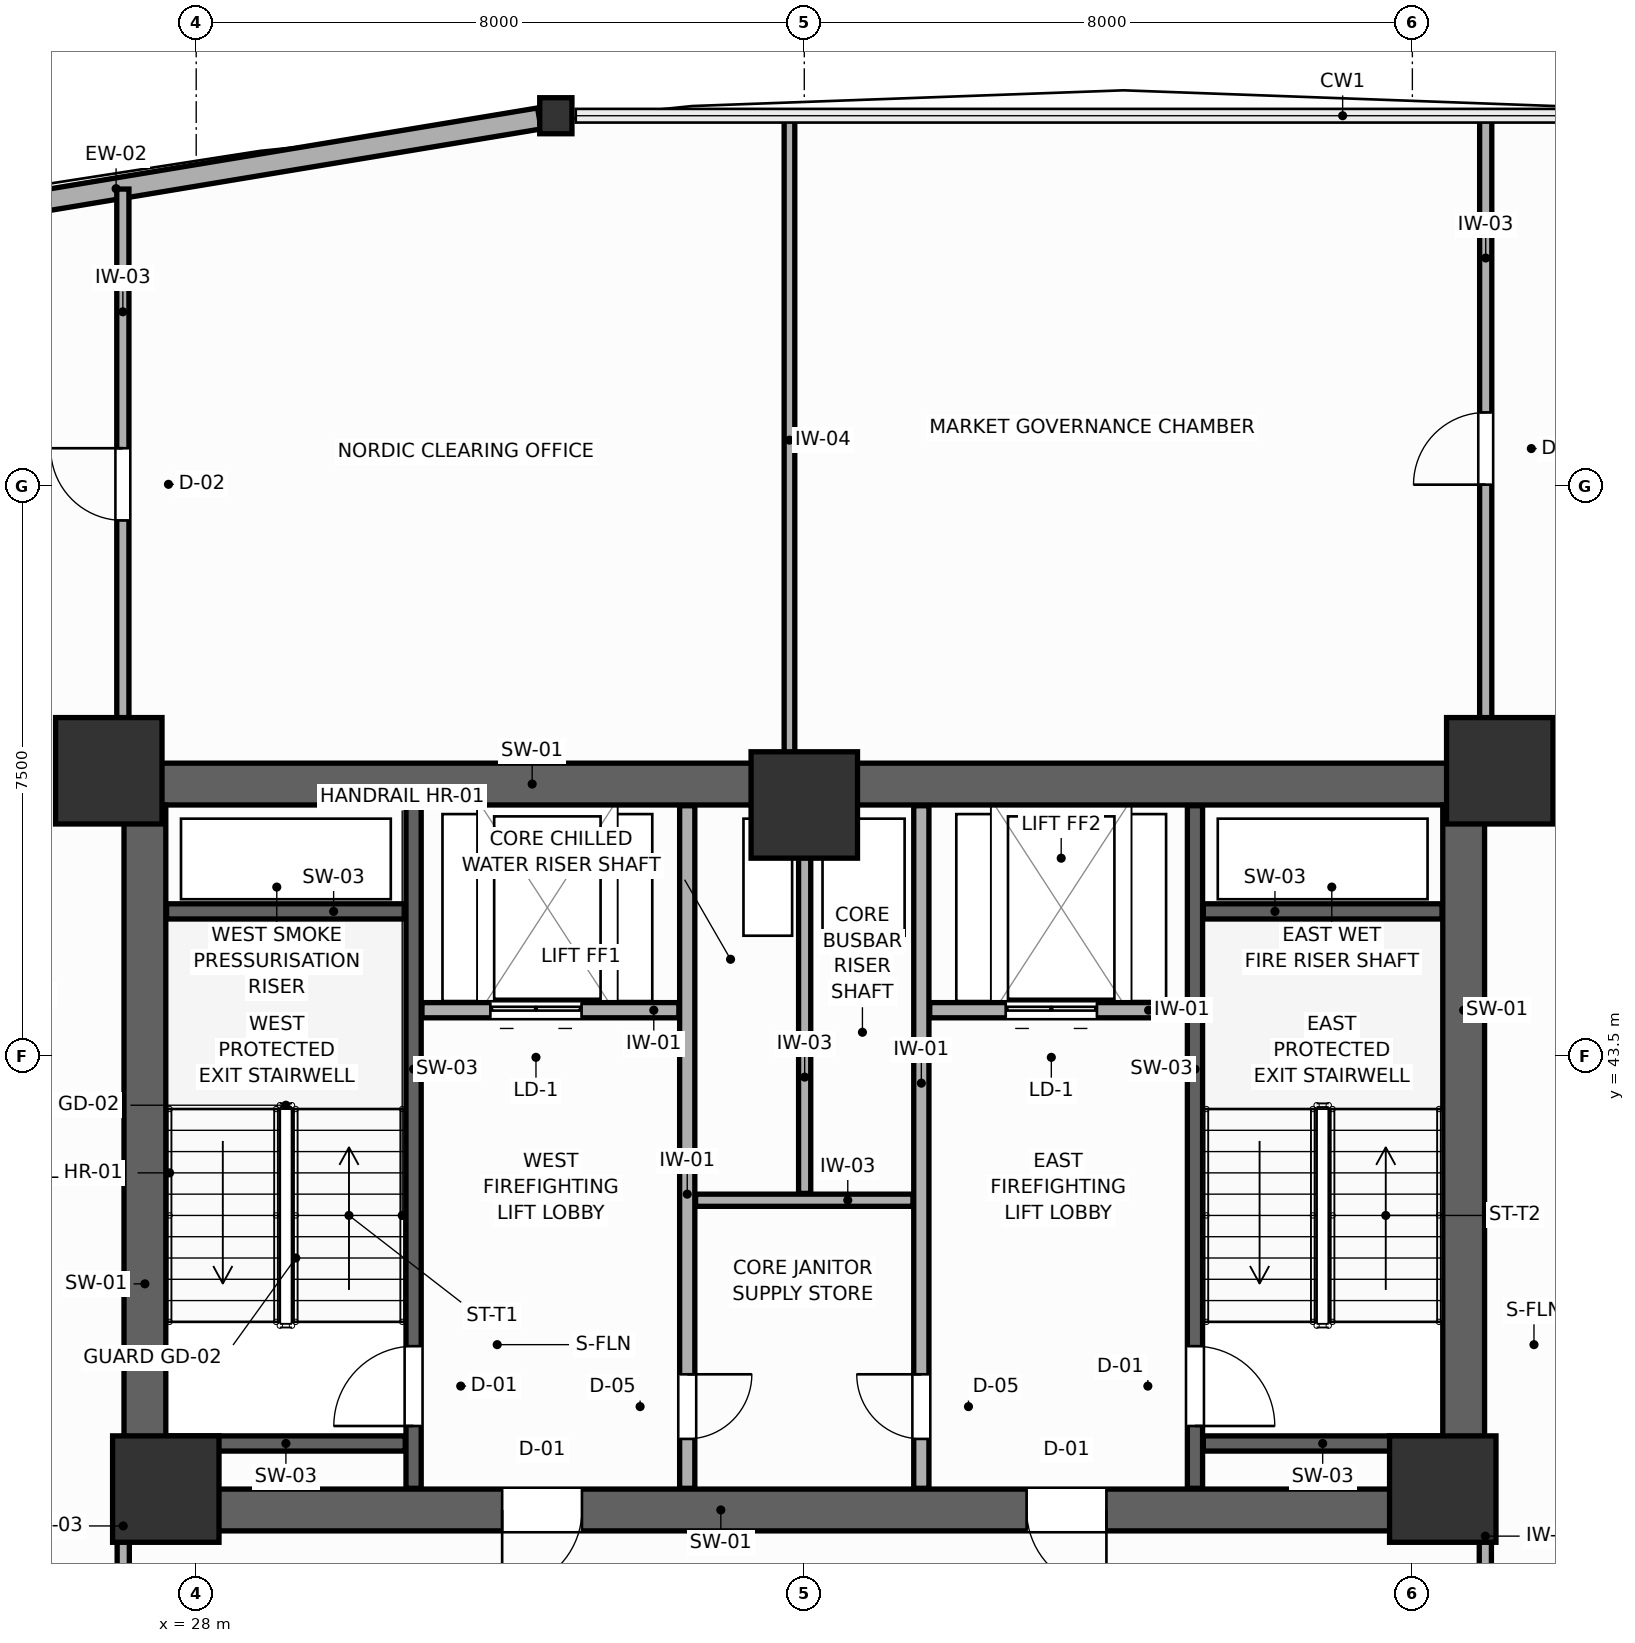
"""IFC4 building model, lengths in metres.
Left out: names, types, materials, properties, quantities, classifications, styles, units other than length and angle.
Written with IfcOpenShell. Run it as: python <this file> out.ifc"""

import sys

from ifc_helpers import new_model, si_unit, direction, frame, frame_2d, origin, origin_2d, place, context, subcontext, project, spatial, rectangle, i_section, extrude, source, transform, mapped, element, fill, save


model = new_model("IFC4")
c1 = context("Model", 3, precision=1e-05, world=origin(), true_north=direction((0.0, 1.0)))
c2 = subcontext(c1, "Body", "Model", "MODEL_VIEW")
j1 = project(units=[si_unit("LENGTHUNIT", "METRE"), si_unit("PLANEANGLEUNIT", "RADIAN")], contexts=[c1])
p1 = place(None, origin())
s1 = spatial("IfcSite", under=j1, at=p1, CompositionType="ELEMENT")
p2 = place(p1, origin())
s2 = spatial("IfcBuilding", under=s1, at=p2, CompositionType="ELEMENT")
p3 = place(p2, frame((0.0, 0.0, 79.5)))
s3 = spatial("IfcBuildingStorey", under=s2, at=p3, CompositionType="ELEMENT", Elevation=79.5)
p4 = place(p3, frame((27.05, 47.075, 0.0), z_axis=(0.0, 0.0, 1.0), x_axis=(1.0, 0.0, 0.0)))
e1 = element("IfcWall", 1, at=p4, inside=s3, PredefinedType="SHEAR", context=c2, shape_type="SweptSolid", body=[
    extrude(rectangle(XDim=17.9, YDim=0.55, at=frame_2d((8.95, 0.0))), origin(), (0.0, 0.0, 1.0), 3.9),
])
p5 = place(p3, frame((27.05, 37.525, 0.0), z_axis=(0.0, 0.0, 1.0), x_axis=(1.0, 0.0, 0.0)))
e2 = element("IfcWall", 2, at=p5, inside=s3, PredefinedType="SHEAR", context=c2, shape_type="SweptSolid", body=[
    extrude(rectangle(XDim=17.9, YDim=0.55, at=frame_2d((8.95, 0.0))), origin(), (0.0, 0.0, 1.0), 3.9),
])
p6 = place(p5, frame((4.975, 0.0, 0.0)))
e3 = element("IfcOpeningElement", 3, at=p6, cuts=e2, PredefinedType="OPENING", context=c2, shape_type="SweptSolid", body=[
    extrude(rectangle(XDim=1.05, YDim=2.1, at=frame_2d((0.525, 1.05))), frame((0.0, 0.285, 0.0), z_axis=(0.0, -1.0, 0.0), x_axis=(1.0, 0.0, 0.0)), (0.0, 0.0, 1.0), 0.57),
])
p7 = place(p5, frame((11.875, 0.0, 0.0)))
e4 = element("IfcOpeningElement", 4, at=p7, cuts=e2, PredefinedType="OPENING", context=c2, shape_type="SweptSolid", body=[
    extrude(rectangle(XDim=1.05, YDim=2.1, at=frame_2d((0.525, 1.05))), frame((0.0, 0.285, 0.0), z_axis=(0.0, -1.0, 0.0), x_axis=(1.0, 0.0, 0.0)), (0.0, 0.0, 1.0), 0.57),
])
for number, where, z_axis, x_axis in (
    (5, (27.325, 37.8, 0.0), (0.0, 0.0, 1.0), (0.0, 1.0, 0.0)),
    (6, (44.675, 37.8, 0.0), (0.0, 0.0, 1.0), (0.0, 1.0, 0.0)),
):
    element("IfcWall", number, at=place(p3, frame(where, z_axis=z_axis, x_axis=x_axis)), inside=s3, PredefinedType="SHEAR", context=c2, shape_type="SweptSolid", body=[
        extrude(rectangle(XDim=9.0, YDim=0.55, at=frame_2d((4.5, 0.0))), origin(), (0.0, 0.0, 1.0), 3.9),
    ])
m1 = source(origin(), c2, "Body", "SweptSolid", [
    extrude(rectangle(XDim=1.4, YDim=1.4, at=origin_2d()), origin(), (0.0, 0.0, 1.0), 3.9),
])
for number, where, z_axis, x_axis in (
    (7, (26.85, 47.25, 0.0), (0.0, 0.0, 1.0), (1.0, 0.0, 0.0)),
    (8, (45.15, 47.25, 0.0), (0.0, 0.0, 1.0), (1.0, 0.0, 0.0)),
    (9, (27.6, 37.8, 0.0), (0.0, 0.0, 1.0), (1.0, 0.0, 0.0)),
    (10, (44.4, 37.8, 0.0), (0.0, 0.0, 1.0), (1.0, 0.0, 0.0)),
    (11, (36.0, 46.8, 0.0), (0.0, 0.0, 1.0), (1.0, 0.0, 0.0)),
):
    element("IfcColumn", number, at=place(p3, frame(where, z_axis=z_axis, x_axis=x_axis)), inside=s3, PredefinedType="COLUMN", context=c2, shape_type="MappedRepresentation", body=[
        mapped(m1, transform((0.0, 0.0, 0.0), scale=1.0)),
    ])
m2 = source(origin(), c2, "Body", "SweptSolid", [
    extrude(i_section(OverallWidth=0.424, OverallDepth=0.474, WebThickness=0.045, FlangeThickness=0.072, FilletRadius=0.015, at=origin_2d()), origin(), (0.0, 0.0, 1.0), 3.9),
])
p8 = place(p3, frame((32.731, 55.868, 0.0), z_axis=(0.0, 0.0, 1.0), x_axis=(1.0, 0.0, 0.0)))
e12 = element("IfcColumn", 12, at=p8, inside=s3, PredefinedType="COLUMN", context=c2, shape_type="MappedRepresentation", body=[
    mapped(m2, transform((0.0, 0.0, 0.0), scale=1.0)),
])
p9 = place(p3, frame((32.514, 55.832, 0.0), z_axis=(0.0, 0.0, 1.0), x_axis=(-0.986523610756, -0.163618964122, 0.0)))
e13 = element("IfcWall", 13, at=p9, inside=s3, PredefinedType="SOLIDWALL", context=c2, shape_type="SweptSolid", body=[
    extrude(rectangle(XDim=17.258, YDim=0.28, at=frame_2d((8.629, 0.0))), origin(), (0.0, 0.0, 1.0), 3.23),
])
p10 = place(p9, frame((11.469, 0.0, 0.75)))
e14 = element("IfcOpeningElement", 14, at=p10, cuts=e13, PredefinedType="OPENING", context=c2, shape_type="SweptSolid", body=[
    extrude(rectangle(XDim=1.7, YDim=1.75, at=frame_2d((0.85, 0.875))), frame((0.0, 0.15, 0.0), z_axis=(0.0, -1.0, 0.0), x_axis=(1.0, 0.0, 0.0)), (0.0, 0.0, 1.0), 0.3),
])
p11 = place(p3, frame((30.86, 37.81, 0.0), z_axis=(0.0, 0.0, 1.0), x_axis=(0.0, 1.0, 0.0)))
e15 = element("IfcWall", 15, at=p11, inside=s3, PredefinedType="SHEAR", context=c2, shape_type="SweptSolid", body=[
    extrude(rectangle(XDim=8.98, YDim=0.2, at=frame_2d((4.49, 0.0))), origin(), (0.0, 0.0, 1.0), 3.9),
])
p12 = place(p11, frame((0.82, 0.0, 0.0)))
e16 = element("IfcOpeningElement", 16, at=p12, cuts=e15, PredefinedType="OPENING", context=c2, shape_type="SweptSolid", body=[
    extrude(rectangle(XDim=1.05, YDim=2.1, at=frame_2d((0.525, 1.05))), frame((0.0, 0.11, 0.0), z_axis=(0.0, -1.0, 0.0), x_axis=(1.0, 0.0, 0.0)), (0.0, 0.0, 1.0), 0.22),
])
for number, where, z_axis, x_axis in (
    (17, (27.61, 45.4, 0.0), (0.0, 0.0, 1.0), (1.0, 0.0, 0.0)),
    (18, (27.61, 38.4, 0.0), (0.0, 0.0, 1.0), (1.0, 0.0, 0.0)),
):
    element("IfcWall", number, at=place(p3, frame(where, z_axis=z_axis, x_axis=x_axis)), inside=s3, PredefinedType="SHEAR", context=c2, shape_type="SweptSolid", body=[
        extrude(rectangle(XDim=3.14, YDim=0.2, at=frame_2d((1.57, 0.0))), origin(), (0.0, 0.0, 1.0), 3.9),
    ])
p13 = place(p3, frame((41.14, 37.81, 0.0), z_axis=(0.0, 0.0, 1.0), x_axis=(0.0, 1.0, 0.0)))
e19 = element("IfcWall", 19, at=p13, inside=s3, PredefinedType="SHEAR", context=c2, shape_type="SweptSolid", body=[
    extrude(rectangle(XDim=8.98, YDim=0.2, at=frame_2d((4.49, 0.0))), origin(), (0.0, 0.0, 1.0), 3.9),
])
p14 = place(p13, frame((0.82, 0.0, 0.0)))
e20 = element("IfcOpeningElement", 20, at=p14, cuts=e19, PredefinedType="OPENING", context=c2, shape_type="SweptSolid", body=[
    extrude(rectangle(XDim=1.05, YDim=2.1, at=frame_2d((0.525, 1.05))), frame((0.0, 0.11, 0.0), z_axis=(0.0, -1.0, 0.0), x_axis=(1.0, 0.0, 0.0)), (0.0, 0.0, 1.0), 0.22),
])
for number, where, z_axis, x_axis in (
    (21, (41.25, 45.4, 0.0), (0.0, 0.0, 1.0), (1.0, 0.0, 0.0)),
    (22, (41.25, 38.4, 0.0), (0.0, 0.0, 1.0), (1.0, 0.0, 0.0)),
):
    element("IfcWall", number, at=place(p3, frame(where, z_axis=z_axis, x_axis=x_axis)), inside=s3, PredefinedType="SHEAR", context=c2, shape_type="SweptSolid", body=[
        extrude(rectangle(XDim=3.14, YDim=0.2, at=frame_2d((1.57, 0.0))), origin(), (0.0, 0.0, 1.0), 3.9),
    ])
p15 = place(p3, frame((30.97, 44.1, 0.0), z_axis=(0.0, 0.0, 1.0), x_axis=(1.0, 0.0, 0.0)))
e23 = element("IfcWall", 23, at=p15, inside=s3, PredefinedType="PARTITIONING", context=c2, shape_type="SweptSolid", body=[
    extrude(rectangle(XDim=3.38, YDim=0.2, at=frame_2d((1.69, 0.0))), origin(), (0.0, 0.0, 1.0), 3.68),
])
p16 = place(p15, frame((0.9, 0.0, 0.0)))
e24 = element("IfcOpeningElement", 24, at=p16, cuts=e23, PredefinedType="OPENING", context=c2, shape_type="SweptSolid", body=[
    extrude(rectangle(XDim=1.2, YDim=2.1, at=frame_2d((0.6, 1.05))), frame((0.0, 0.11, 0.0), z_axis=(0.0, -1.0, 0.0), x_axis=(1.0, 0.0, 0.0)), (0.0, 0.0, 1.0), 0.22),
])
p17 = place(p3, frame((37.65, 44.1, 0.0), z_axis=(0.0, 0.0, 1.0), x_axis=(1.0, 0.0, 0.0)))
e25 = element("IfcWall", 25, at=p17, inside=s3, PredefinedType="PARTITIONING", context=c2, shape_type="SweptSolid", body=[
    extrude(rectangle(XDim=3.38, YDim=0.2, at=frame_2d((1.69, 0.0))), origin(), (0.0, 0.0, 1.0), 3.68),
])
p18 = place(p17, frame((1.0, 0.0, 0.0)))
e26 = element("IfcOpeningElement", 26, at=p18, cuts=e25, PredefinedType="OPENING", context=c2, shape_type="SweptSolid", body=[
    extrude(rectangle(XDim=1.2, YDim=2.1, at=frame_2d((0.6, 1.05))), frame((0.0, 0.11, 0.0), z_axis=(0.0, -1.0, 0.0), x_axis=(1.0, 0.0, 0.0)), (0.0, 0.0, 1.0), 0.22),
])
p19 = place(p3, frame((34.46, 37.81, 0.0), z_axis=(0.0, 0.0, 1.0), x_axis=(0.0, 1.0, 0.0)))
e27 = element("IfcWall", 27, at=p19, inside=s3, PredefinedType="PARTITIONING", context=c2, shape_type="SweptSolid", body=[
    extrude(rectangle(XDim=8.98, YDim=0.2, at=frame_2d((4.49, 0.0))), origin(), (0.0, 0.0, 1.0), 3.68),
])
p20 = place(p19, frame((0.65, 0.0, 0.0)))
e28 = element("IfcOpeningElement", 28, at=p20, cuts=e27, PredefinedType="OPENING", context=c2, shape_type="SweptSolid", body=[
    extrude(rectangle(XDim=0.85, YDim=2.05, at=frame_2d((0.425, 1.025))), frame((0.0, 0.11, 0.0), z_axis=(0.0, -1.0, 0.0), x_axis=(1.0, 0.0, 0.0)), (0.0, 0.0, 1.0), 0.22),
])
p21 = place(p3, frame((37.54, 37.81, 0.0), z_axis=(0.0, 0.0, 1.0), x_axis=(0.0, 1.0, 0.0)))
e29 = element("IfcWall", 29, at=p21, inside=s3, PredefinedType="PARTITIONING", context=c2, shape_type="SweptSolid", body=[
    extrude(rectangle(XDim=8.98, YDim=0.2, at=frame_2d((4.49, 0.0))), origin(), (0.0, 0.0, 1.0), 3.68),
])
p22 = place(p21, frame((0.65, 0.0, 0.0)))
e30 = element("IfcOpeningElement", 30, at=p22, cuts=e29, PredefinedType="OPENING", context=c2, shape_type="SweptSolid", body=[
    extrude(rectangle(XDim=0.85, YDim=2.05, at=frame_2d((0.425, 1.025))), frame((0.0, 0.11, 0.0), z_axis=(0.0, -1.0, 0.0), x_axis=(1.0, 0.0, 0.0)), (0.0, 0.0, 1.0), 0.22),
])
p23 = place(p3, frame((34.57, 41.6, 0.0), z_axis=(0.0, 0.0, 1.0), x_axis=(1.0, 0.0, 0.0)))
e31 = element("IfcWall", 31, at=p23, inside=s3, PredefinedType="PARTITIONING", context=c2, shape_type="SweptSolid", body=[
    extrude(rectangle(XDim=2.86, YDim=0.16, at=frame_2d((1.43, 0.0))), origin(), (0.0, 0.0, 1.0), 3.68),
])
p24 = place(p3, frame((36.005, 41.69, 0.0), z_axis=(0.0, 0.0, 1.0), x_axis=(0.0, 1.0, 0.0)))
e32 = element("IfcWall", 32, at=p24, inside=s3, PredefinedType="PARTITIONING", context=c2, shape_type="SweptSolid", body=[
    extrude(rectangle(XDim=5.1, YDim=0.16, at=frame_2d((2.55, 0.0))), origin(), (0.0, 0.0, 1.0), 3.68),
])
p25 = place(p3, frame((27.04, 35.0, 0.0), z_axis=(0.0, 0.0, 1.0), x_axis=(0.0, 1.0, 0.0)))
e33 = element("IfcWall", 33, at=p25, inside=s3, PredefinedType="PARTITIONING", context=c2, shape_type="SweptSolid", body=[
    extrude(rectangle(XDim=2.65, YDim=0.16, at=frame_2d((1.325, 0.0))), origin(), (0.0, 0.0, 1.0), 3.68),
])
p26 = place(p25, frame((0.75, 0.0, 0.0)))
e34 = element("IfcOpeningElement", 34, at=p26, cuts=e33, PredefinedType="OPENING", context=c2, shape_type="SweptSolid", body=[
    extrude(rectangle(XDim=1.05, YDim=2.1, at=frame_2d((0.525, 1.05))), frame((0.0, 0.09, 0.0), z_axis=(0.0, -1.0, 0.0), x_axis=(1.0, 0.0, 0.0)), (0.0, 0.0, 1.0), 0.18),
])
p27 = place(p3, frame((44.96, 35.0, 0.0), z_axis=(0.0, 0.0, 1.0), x_axis=(0.0, 1.0, 0.0)))
e35 = element("IfcWall", 35, at=p27, inside=s3, PredefinedType="PARTITIONING", context=c2, shape_type="SweptSolid", body=[
    extrude(rectangle(XDim=2.65, YDim=0.16, at=frame_2d((1.325, 0.0))), origin(), (0.0, 0.0, 1.0), 3.68),
])
p28 = place(p27, frame((0.75, 0.0, 0.0)))
e36 = element("IfcOpeningElement", 36, at=p28, cuts=e35, PredefinedType="OPENING", context=c2, shape_type="SweptSolid", body=[
    extrude(rectangle(XDim=1.05, YDim=2.1, at=frame_2d((0.525, 1.05))), frame((0.0, 0.09, 0.0), z_axis=(0.0, -1.0, 0.0), x_axis=(1.0, 0.0, 0.0)), (0.0, 0.0, 1.0), 0.18),
])
p29 = place(p3, frame((44.965, 47.34, 0.0), z_axis=(0.0, 0.0, 1.0), x_axis=(0.0, 1.0, 0.0)))
e37 = element("IfcWall", 37, at=p29, inside=s3, PredefinedType="PARTITIONING", context=c2, shape_type="SweptSolid", body=[
    extrude(rectangle(XDim=8.508, YDim=0.16, at=frame_2d((4.254, 0.0))), origin(), (0.0, 0.0, 1.0), 3.68),
])
p30 = place(p29, frame((3.674, 0.0, 0.0)))
e38 = element("IfcOpeningElement", 38, at=p30, cuts=e37, PredefinedType="OPENING", context=c2, shape_type="SweptSolid", body=[
    extrude(rectangle(XDim=0.95, YDim=2.05, at=frame_2d((0.475, 1.025))), frame((0.0, 0.09, 0.0), z_axis=(0.0, -1.0, 0.0), x_axis=(1.0, 0.0, 0.0)), (0.0, 0.0, 1.0), 0.18),
])
p31 = place(p3, frame((27.035, 47.34, 0.0), z_axis=(0.0, 0.0, 1.0), x_axis=(0.0, 1.0, 0.0)))
e39 = element("IfcWall", 39, at=p31, inside=s3, PredefinedType="PARTITIONING", context=c2, shape_type="SweptSolid", body=[
    extrude(rectangle(XDim=7.563, YDim=0.16, at=frame_2d((3.781, 0.0))), origin(), (0.0, 0.0, 1.0), 3.68),
])
p32 = place(p31, frame((3.204, 0.0, 0.0)))
e40 = element("IfcOpeningElement", 40, at=p32, cuts=e39, PredefinedType="OPENING", context=c2, shape_type="SweptSolid", body=[
    extrude(rectangle(XDim=0.95, YDim=2.05, at=frame_2d((0.475, 1.025))), frame((0.0, 0.09, 0.0), z_axis=(0.0, -1.0, 0.0), x_axis=(1.0, 0.0, 0.0)), (0.0, 0.0, 1.0), 0.18),
])
p33 = place(p3, frame((35.805, 47.352, 0.0), z_axis=(0.0, 0.0, 1.0), x_axis=(0.0, 1.0, 0.0)))
e41 = element("IfcWall", 41, at=p33, inside=s3, PredefinedType="PARTITIONING", context=c2, shape_type="SweptSolid", body=[
    extrude(rectangle(XDim=8.496, YDim=0.14, at=frame_2d((4.248, 0.0))), origin(), (0.0, 0.0, 1.0), 3.68),
])
p34 = place(p12, origin())
e42 = element("IfcDoor", 42, at=p34, inside=s3, OperationType="SINGLE_SWING_LEFT", PredefinedType="DOOR", context=c2, shape_type="SweptSolid", body=[
    extrude(rectangle(XDim=1.05, YDim=2.1, at=frame_2d((0.525, 1.05))), frame((0.0, 0.025, 0.0), z_axis=(0.0, -1.0, 0.0), x_axis=(1.0, 0.0, 0.0)), (0.0, 0.0, 1.0), 0.05),
])
fill(e16, e42)
p35 = place(p14, frame((1.05, 0.0, 0.0), z_axis=(0.0, 0.0, 1.0), x_axis=(-1.0, 0.0, 0.0)))
e43 = element("IfcDoor", 43, at=p35, inside=s3, OperationType="SINGLE_SWING_RIGHT", PredefinedType="DOOR", context=c2, shape_type="SweptSolid", body=[
    extrude(rectangle(XDim=1.05, YDim=2.1, at=frame_2d((0.525, 1.05))), frame((0.0, 0.025, 0.0), z_axis=(0.0, -1.0, 0.0), x_axis=(1.0, 0.0, 0.0)), (0.0, 0.0, 1.0), 0.05),
])
fill(e20, e43)
p36 = place(p16, origin())
e44 = element("IfcDoor", 44, at=p36, inside=s3, OperationType="DOUBLE_DOOR_SLIDING", PredefinedType="DOOR", context=c2, shape_type="SweptSolid", body=[
    extrude(rectangle(XDim=1.2, YDim=2.1, at=frame_2d((0.6, 1.05))), frame((0.0, 0.025, 0.0), z_axis=(0.0, -1.0, 0.0), x_axis=(1.0, 0.0, 0.0)), (0.0, 0.0, 1.0), 0.05),
])
fill(e24, e44)
p37 = place(p18, origin())
e45 = element("IfcDoor", 45, at=p37, inside=s3, OperationType="DOUBLE_DOOR_SLIDING", PredefinedType="DOOR", context=c2, shape_type="SweptSolid", body=[
    extrude(rectangle(XDim=1.2, YDim=2.1, at=frame_2d((0.6, 1.05))), frame((0.0, 0.025, 0.0), z_axis=(0.0, -1.0, 0.0), x_axis=(1.0, 0.0, 0.0)), (0.0, 0.0, 1.0), 0.05),
])
fill(e26, e45)
p38 = place(p20, frame((0.85, 0.0, 0.0), z_axis=(0.0, 0.0, 1.0), x_axis=(-1.0, 0.0, 0.0)))
e46 = element("IfcDoor", 46, at=p38, inside=s3, OperationType="SINGLE_SWING_LEFT", PredefinedType="DOOR", context=c2, shape_type="SweptSolid", body=[
    extrude(rectangle(XDim=0.85, YDim=2.05, at=frame_2d((0.425, 1.025))), frame((0.0, 0.025, 0.0), z_axis=(0.0, -1.0, 0.0), x_axis=(1.0, 0.0, 0.0)), (0.0, 0.0, 1.0), 0.05),
])
fill(e28, e46)
p39 = place(p22, origin())
e47 = element("IfcDoor", 47, at=p39, inside=s3, OperationType="SINGLE_SWING_RIGHT", PredefinedType="DOOR", context=c2, shape_type="SweptSolid", body=[
    extrude(rectangle(XDim=0.85, YDim=2.05, at=frame_2d((0.425, 1.025))), frame((0.0, 0.025, 0.0), z_axis=(0.0, -1.0, 0.0), x_axis=(1.0, 0.0, 0.0)), (0.0, 0.0, 1.0), 0.05),
])
fill(e30, e47)
p40 = place(p30, origin())
e48 = element("IfcDoor", 48, at=p40, inside=s3, OperationType="SINGLE_SWING_LEFT", PredefinedType="DOOR", context=c2, shape_type="SweptSolid", body=[
    extrude(rectangle(XDim=0.95, YDim=2.05, at=frame_2d((0.475, 1.025))), frame((0.0, 0.025, 0.0), z_axis=(0.0, -1.0, 0.0), x_axis=(1.0, 0.0, 0.0)), (0.0, 0.0, 1.0), 0.05),
])
fill(e38, e48)
p41 = place(p32, origin())
e49 = element("IfcDoor", 49, at=p41, inside=s3, OperationType="SINGLE_SWING_RIGHT", PredefinedType="DOOR", context=c2, shape_type="SweptSolid", body=[
    extrude(rectangle(XDim=0.95, YDim=2.05, at=frame_2d((0.475, 1.025))), frame((0.0, 0.025, 0.0), z_axis=(0.0, -1.0, 0.0), x_axis=(1.0, 0.0, 0.0)), (0.0, 0.0, 1.0), 0.05),
])
fill(e40, e49)
p42 = place(p6, frame((1.05, 0.0, 0.0), z_axis=(0.0, 0.0, 1.0), x_axis=(-1.0, 0.0, 0.0)))
e50 = element("IfcDoor", 50, at=p42, inside=s3, OperationType="SINGLE_SWING_RIGHT", PredefinedType="DOOR", context=c2, shape_type="SweptSolid", body=[
    extrude(rectangle(XDim=1.05, YDim=2.1, at=frame_2d((0.525, 1.05))), frame((0.0, 0.025, 0.0), z_axis=(0.0, -1.0, 0.0), x_axis=(1.0, 0.0, 0.0)), (0.0, 0.0, 1.0), 0.05),
])
fill(e3, e50)
p43 = place(p7, frame((1.05, 0.0, 0.0), z_axis=(0.0, 0.0, 1.0), x_axis=(-1.0, 0.0, 0.0)))
e51 = element("IfcDoor", 51, at=p43, inside=s3, OperationType="SINGLE_SWING_LEFT", PredefinedType="DOOR", context=c2, shape_type="SweptSolid", body=[
    extrude(rectangle(XDim=1.05, YDim=2.1, at=frame_2d((0.525, 1.05))), frame((0.0, 0.025, 0.0), z_axis=(0.0, -1.0, 0.0), x_axis=(1.0, 0.0, 0.0)), (0.0, 0.0, 1.0), 0.05),
])
fill(e4, e51)
save(model, sys.argv[1])
